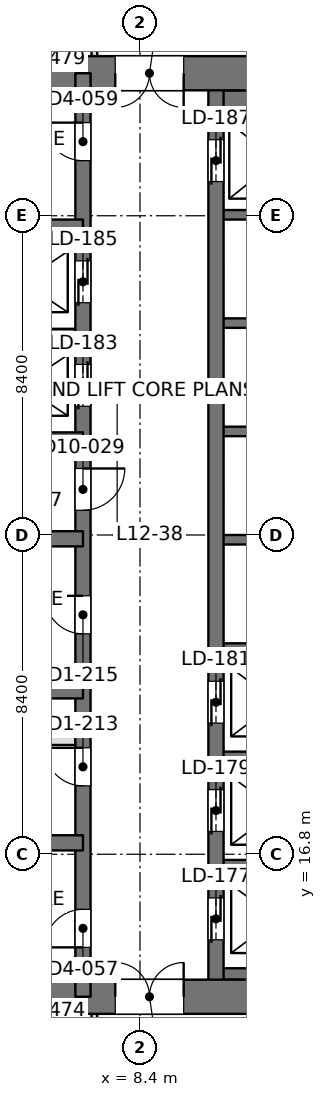
"""IFC4 building model, lengths in metres.
Left out: names, types, materials, properties, quantities, classifications, styles, units other than length and angle.
Written with IfcOpenShell. Run it as: python <this file> out.ifc"""

import sys

from ifc_helpers import new_model, si_unit, direction, frame, frame_2d, origin, place, context, subcontext, project, spatial, rectangle, extrude, element, fill, save


model = new_model("IFC4")
c1 = context("Model", 3, precision=1e-05, world=origin(), true_north=direction((0.0, 1.0)))
c2 = subcontext(c1, "Body", "Model", "MODEL_VIEW")
j1 = project(units=[si_unit("LENGTHUNIT", "METRE"), si_unit("PLANEANGLEUNIT", "RADIAN")], contexts=[c1])
p1 = place(None, origin())
s1 = spatial("IfcSite", under=j1, at=p1, CompositionType="ELEMENT")
p2 = place(p1, origin())
s2 = spatial("IfcBuilding", under=s1, at=p2, CompositionType="ELEMENT")
p3 = place(p2, frame((0.0, 0.0, 54.9)))
s3 = spatial("IfcBuildingStorey", under=s2, at=p3, CompositionType="ELEMENT", Elevation=54.9)
p4 = place(p3, frame((-1.2, 13.05, 0.0), z_axis=(0.0, 0.0, 1.0), x_axis=(1.0, 0.0, 0.0)))
e1 = element("IfcWall", 1, at=p4, inside=s3, PredefinedType="SHEAR", context=c2, shape_type="SweptSolid", body=[
    extrude(rectangle(XDim=18.0, YDim=0.9, at=frame_2d((9.0, 0.0))), origin(), (0.0, 0.0, 1.0), 4.5),
])
p5 = place(p4, frame((8.95, 0.0, 0.0)))
e2 = element("IfcOpeningElement", 2, at=p5, cuts=e1, PredefinedType="OPENING", context=c2, shape_type="SweptSolid", body=[
    extrude(rectangle(XDim=1.8, YDim=2.4, at=frame_2d((0.9, 1.2))), frame((0.0, 0.46, 0.0), z_axis=(0.0, -1.0, 0.0), x_axis=(1.0, 0.0, 0.0)), (0.0, 0.0, 1.0), 0.92),
])
p6 = place(p3, frame((-1.2, 37.35, 0.0), z_axis=(0.0, 0.0, 1.0), x_axis=(1.0, 0.0, 0.0)))
e3 = element("IfcWall", 3, at=p6, inside=s3, PredefinedType="SHEAR", context=c2, shape_type="SweptSolid", body=[
    extrude(rectangle(XDim=18.0, YDim=0.9, at=frame_2d((9.0, 0.0))), origin(), (0.0, 0.0, 1.0), 4.5),
])
p7 = place(p6, frame((8.95, 0.0, 0.0)))
e4 = element("IfcOpeningElement", 4, at=p7, cuts=e3, PredefinedType="OPENING", context=c2, shape_type="SweptSolid", body=[
    extrude(rectangle(XDim=1.8, YDim=2.4, at=frame_2d((0.9, 1.2))), frame((0.0, 0.46, 0.0), z_axis=(0.0, -1.0, 0.0), x_axis=(1.0, 0.0, 0.0)), (0.0, 0.0, 1.0), 0.92),
])
p8 = place(p3, frame((6.9, 13.05, 0.0), z_axis=(0.0, 0.0, 1.0), x_axis=(0.0, 1.0, 0.0)))
e5 = element("IfcWall", 5, at=p8, inside=s3, PredefinedType="SHEAR", context=c2, shape_type="SweptSolid", body=[
    extrude(rectangle(XDim=24.3, YDim=0.4, at=frame_2d((12.15, 0.0))), origin(), (0.0, 0.0, 1.0), 4.5),
])
p9 = place(p8, frame((1.3, 0.0, 0.0)))
e6 = element("IfcOpeningElement", 6, at=p9, cuts=e5, PredefinedType="OPENING", context=c2, shape_type="SweptSolid", body=[
    extrude(rectangle(XDim=1.0, YDim=2.2, at=frame_2d((0.5, 1.1))), frame((0.0, 0.21, 0.0), z_axis=(0.0, -1.0, 0.0), x_axis=(1.0, 0.0, 0.0)), (0.0, 0.0, 1.0), 0.42),
])
p10 = place(p8, frame((22.0, 0.0, 0.0)))
e7 = element("IfcOpeningElement", 7, at=p10, cuts=e5, PredefinedType="OPENING", context=c2, shape_type="SweptSolid", body=[
    extrude(rectangle(XDim=1.0, YDim=2.2, at=frame_2d((0.5, 1.1))), frame((0.0, 0.21, 0.0), z_axis=(0.0, -1.0, 0.0), x_axis=(1.0, 0.0, 0.0)), (0.0, 0.0, 1.0), 0.42),
])
p11 = place(p8, frame((5.55, 0.0, 0.0)))
e8 = element("IfcOpeningElement", 8, at=p11, cuts=e5, PredefinedType="OPENING", context=c2, shape_type="SweptSolid", body=[
    extrude(rectangle(XDim=1.0, YDim=2.2, at=frame_2d((0.5, 1.1))), frame((0.0, 0.21, 0.0), z_axis=(0.0, -1.0, 0.0), x_axis=(1.0, 0.0, 0.0)), (0.0, 0.0, 1.0), 0.42),
])
p12 = place(p8, frame((9.55, 0.0, 0.0)))
e9 = element("IfcOpeningElement", 9, at=p12, cuts=e5, PredefinedType="OPENING", context=c2, shape_type="SweptSolid", body=[
    extrude(rectangle(XDim=1.0, YDim=2.2, at=frame_2d((0.5, 1.1))), frame((0.0, 0.21, 0.0), z_axis=(0.0, -1.0, 0.0), x_axis=(1.0, 0.0, 0.0)), (0.0, 0.0, 1.0), 0.42),
])
p13 = place(p8, frame((12.8, 0.0, 0.0)))
e10 = element("IfcOpeningElement", 10, at=p13, cuts=e5, PredefinedType="OPENING", context=c2, shape_type="SweptSolid", body=[
    extrude(rectangle(XDim=1.1, YDim=2.2, at=frame_2d((0.55, 1.1))), frame((0.0, 0.21, 0.0), z_axis=(0.0, -1.0, 0.0), x_axis=(1.0, 0.0, 0.0)), (0.0, 0.0, 1.0), 0.42),
])
p14 = place(p8, frame((15.538, 0.0, 0.0)))
e11 = element("IfcOpeningElement", 11, at=p14, cuts=e5, PredefinedType="OPENING", context=c2, shape_type="SweptSolid", body=[
    extrude(rectangle(XDim=1.1, YDim=2.2, at=frame_2d((0.55, 1.1))), frame((0.0, 0.21, 0.0), z_axis=(0.0, -1.0, 0.0), x_axis=(1.0, 0.0, 0.0)), (0.0, 0.0, 1.0), 0.42),
])
p15 = place(p8, frame((18.262, 0.0, 0.0)))
e12 = element("IfcOpeningElement", 12, at=p15, cuts=e5, PredefinedType="OPENING", context=c2, shape_type="SweptSolid", body=[
    extrude(rectangle(XDim=1.1, YDim=2.2, at=frame_2d((0.55, 1.1))), frame((0.0, 0.21, 0.0), z_axis=(0.0, -1.0, 0.0), x_axis=(1.0, 0.0, 0.0)), (0.0, 0.0, 1.0), 0.42),
])
p16 = place(p3, frame((10.4, 13.05, 0.0), z_axis=(0.0, 0.0, 1.0), x_axis=(0.0, 1.0, 0.0)))
e13 = element("IfcWall", 13, at=p16, inside=s3, PredefinedType="SHEAR", context=c2, shape_type="SweptSolid", body=[
    extrude(rectangle(XDim=24.3, YDim=0.4, at=frame_2d((12.15, 0.0))), origin(), (0.0, 0.0, 1.0), 4.5),
])
p17 = place(p16, frame((1.5, 0.0, 0.0)))
e14 = element("IfcOpeningElement", 14, at=p17, cuts=e13, PredefinedType="OPENING", context=c2, shape_type="SweptSolid", body=[
    extrude(rectangle(XDim=1.1, YDim=2.2, at=frame_2d((0.55, 1.1))), frame((0.0, 0.21, 0.0), z_axis=(0.0, -1.0, 0.0), x_axis=(1.0, 0.0, 0.0)), (0.0, 0.0, 1.0), 0.42),
])
p18 = place(p16, frame((4.35, 0.0, 0.0)))
e15 = element("IfcOpeningElement", 15, at=p18, cuts=e13, PredefinedType="OPENING", context=c2, shape_type="SweptSolid", body=[
    extrude(rectangle(XDim=1.1, YDim=2.2, at=frame_2d((0.55, 1.1))), frame((0.0, 0.21, 0.0), z_axis=(0.0, -1.0, 0.0), x_axis=(1.0, 0.0, 0.0)), (0.0, 0.0, 1.0), 0.42),
])
p19 = place(p16, frame((7.2, 0.0, 0.0)))
e16 = element("IfcOpeningElement", 16, at=p19, cuts=e13, PredefinedType="OPENING", context=c2, shape_type="SweptSolid", body=[
    extrude(rectangle(XDim=1.1, YDim=2.2, at=frame_2d((0.55, 1.1))), frame((0.0, 0.21, 0.0), z_axis=(0.0, -1.0, 0.0), x_axis=(1.0, 0.0, 0.0)), (0.0, 0.0, 1.0), 0.42),
])
p20 = place(p16, frame((21.45, 0.0, 0.0)))
e17 = element("IfcOpeningElement", 17, at=p20, cuts=e13, PredefinedType="OPENING", context=c2, shape_type="SweptSolid", body=[
    extrude(rectangle(XDim=1.1, YDim=2.2, at=frame_2d((0.55, 1.1))), frame((0.0, 0.21, 0.0), z_axis=(0.0, -1.0, 0.0), x_axis=(1.0, 0.0, 0.0)), (0.0, 0.0, 1.0), 0.42),
])
for number, where, z_axis, x_axis in (
    (18, (-0.75, 17.1, 0.0), (0.0, 0.0, 1.0), (1.0, 0.0, 0.0)),
    (19, (-0.75, 21.1, 0.0), (0.0, 0.0, 1.0), (1.0, 0.0, 0.0)),
    (20, (-0.75, 25.1, 0.0), (0.0, 0.0, 1.0), (1.0, 0.0, 0.0)),
    (21, (-0.75, 27.7, 0.0), (0.0, 0.0, 1.0), (1.0, 0.0, 0.0)),
    (22, (-0.75, 33.3, 0.0), (0.0, 0.0, 1.0), (1.0, 0.0, 0.0)),
):
    element("IfcWall", number, at=place(p3, frame(where, z_axis=z_axis, x_axis=x_axis)), inside=s3, PredefinedType="SHEAR", context=c2, shape_type="SweptSolid", body=[
        extrude(rectangle(XDim=7.65, YDim=0.4, at=frame_2d((3.825, 0.0))), origin(), (0.0, 0.0, 1.0), 4.5),
    ])
p21 = place(p3, frame((3.7, 30.5, 0.0), z_axis=(0.0, 0.0, 1.0), x_axis=(1.0, 0.0, 0.0)))
e23 = element("IfcWall", 23, at=p21, inside=s3, PredefinedType="SHEAR", context=c2, shape_type="SweptSolid", body=[
    extrude(rectangle(XDim=3.2, YDim=0.25, at=frame_2d((1.6, 0.0))), origin(), (0.0, 0.0, 1.0), 4.5),
])
p22 = place(p3, frame((10.4, 13.65, 0.0), z_axis=(0.0, 0.0, 1.0), x_axis=(1.0, 0.0, 0.0)))
e24 = element("IfcWall", 24, at=p22, inside=s3, PredefinedType="SHEAR", context=c2, shape_type="SweptSolid", body=[
    extrude(rectangle(XDim=3.2, YDim=0.3, at=frame_2d((1.6, 0.0))), origin(), (0.0, 0.0, 1.0), 4.5),
])
for number, where, z_axis, x_axis in (
    (25, (10.4, 16.525, 0.0), (0.0, 0.0, 1.0), (1.0, 0.0, 0.0)),
    (26, (10.4, 19.375, 0.0), (0.0, 0.0, 1.0), (1.0, 0.0, 0.0)),
    (27, (10.4, 22.225, 0.0), (0.0, 0.0, 1.0), (1.0, 0.0, 0.0)),
    (28, (10.4, 25.075, 0.0), (0.0, 0.0, 1.0), (1.0, 0.0, 0.0)),
    (29, (10.4, 27.925, 0.0), (0.0, 0.0, 1.0), (1.0, 0.0, 0.0)),
    (30, (10.4, 30.775, 0.0), (0.0, 0.0, 1.0), (1.0, 0.0, 0.0)),
    (31, (10.4, 33.625, 0.0), (0.0, 0.0, 1.0), (1.0, 0.0, 0.0)),
):
    element("IfcWall", number, at=place(p3, frame(where, z_axis=z_axis, x_axis=x_axis)), inside=s3, PredefinedType="SHEAR", context=c2, shape_type="SweptSolid", body=[
        extrude(rectangle(XDim=3.2, YDim=0.25, at=frame_2d((1.6, 0.0))), origin(), (0.0, 0.0, 1.0), 4.5),
    ])
p23 = place(p3, frame((10.4, 36.625, 0.0), z_axis=(0.0, 0.0, 1.0), x_axis=(1.0, 0.0, 0.0)))
e32 = element("IfcWall", 32, at=p23, inside=s3, PredefinedType="SHEAR", context=c2, shape_type="SweptSolid", body=[
    extrude(rectangle(XDim=3.2, YDim=0.55, at=frame_2d((1.6, 0.0))), origin(), (0.0, 0.0, 1.0), 4.5),
])
p24 = place(p3, frame((7.2, 10.474, 0.0), z_axis=(0.0, 0.0, 1.0), x_axis=(0.0, 1.0, 0.0)))
e33 = element("IfcWall", 33, at=p24, inside=s3, PredefinedType="PARTITIONING", context=c2, shape_type="SweptSolid", body=[
    extrude(rectangle(XDim=2.128, YDim=0.15, at=frame_2d((1.064, 0.0))), origin(), (0.0, 0.0, 1.0), 4.34),
])
p25 = place(p24, frame((0.526, 0.0, 0.0)))
e34 = element("IfcOpeningElement", 34, at=p25, cuts=e33, PredefinedType="OPENING", context=c2, shape_type="SweptSolid", body=[
    extrude(rectangle(XDim=1.0, YDim=2.2, at=frame_2d((0.5, 1.1))), frame((0.0, 0.085, 0.0), z_axis=(0.0, -1.0, 0.0), x_axis=(1.0, 0.0, 0.0)), (0.0, 0.0, 1.0), 0.17),
])
p26 = place(p3, frame((7.2, 37.8, 0.0), z_axis=(0.0, 0.0, 1.0), x_axis=(0.0, 1.0, 0.0)))
e35 = element("IfcWall", 35, at=p26, inside=s3, PredefinedType="PARTITIONING", context=c2, shape_type="SweptSolid", body=[
    extrude(rectangle(XDim=2.126, YDim=0.15, at=frame_2d((1.063, 0.0))), origin(), (0.0, 0.0, 1.0), 4.34),
])
p27 = place(p26, frame((0.6, 0.0, 0.0)))
e36 = element("IfcOpeningElement", 36, at=p27, cuts=e35, PredefinedType="OPENING", context=c2, shape_type="SweptSolid", body=[
    extrude(rectangle(XDim=1.0, YDim=2.2, at=frame_2d((0.5, 1.1))), frame((0.0, 0.085, 0.0), z_axis=(0.0, -1.0, 0.0), x_axis=(1.0, 0.0, 0.0)), (0.0, 0.0, 1.0), 0.17),
])
p28 = place(p3, frame((0.1, 19.8, 0.0), z_axis=(0.0, 0.0, 1.0), x_axis=(1.0, 0.0, 0.0)))
e37 = element("IfcWall", 37, at=p28, inside=s3, PredefinedType="PARTITIONING", context=c2, shape_type="SweptSolid", body=[
    extrude(rectangle(XDim=6.6, YDim=0.25, at=frame_2d((3.3, 0.0))), origin(), (0.0, 0.0, 1.0), 4.3),
])
p29 = place(p28, frame((2.875, 0.0, 0.0)))
e38 = element("IfcOpeningElement", 38, at=p29, cuts=e37, PredefinedType="OPENING", context=c2, shape_type="SweptSolid", body=[
    extrude(rectangle(XDim=0.9, YDim=2.2, at=frame_2d((0.45, 1.1))), frame((0.0, 0.135, 0.0), z_axis=(0.0, -1.0, 0.0), x_axis=(1.0, 0.0, 0.0)), (0.0, 0.0, 1.0), 0.27),
])
p30 = place(p5, origin())
e39 = element("IfcDoor", 39, at=p30, inside=s3, OperationType="DOUBLE_DOOR_SINGLE_SWING", PredefinedType="DOOR", context=c2, shape_type="SweptSolid", body=[
    extrude(rectangle(XDim=1.8, YDim=2.4, at=frame_2d((0.9, 1.2))), frame((0.0, 0.025, 0.0), z_axis=(0.0, -1.0, 0.0), x_axis=(1.0, 0.0, 0.0)), (0.0, 0.0, 1.0), 0.05),
])
fill(e2, e39)
p31 = place(p7, frame((1.8, 0.0, 0.0), z_axis=(0.0, 0.0, 1.0), x_axis=(-1.0, 0.0, 0.0)))
e40 = element("IfcDoor", 40, at=p31, inside=s3, OperationType="DOUBLE_DOOR_SINGLE_SWING", PredefinedType="DOOR", context=c2, shape_type="SweptSolid", body=[
    extrude(rectangle(XDim=1.8, YDim=2.4, at=frame_2d((0.9, 1.2))), frame((0.0, 0.025, 0.0), z_axis=(0.0, -1.0, 0.0), x_axis=(1.0, 0.0, 0.0)), (0.0, 0.0, 1.0), 0.05),
])
fill(e4, e40)
p32 = place(p9, origin())
e41 = element("IfcDoor", 41, at=p32, inside=s3, OperationType="SINGLE_SWING_LEFT", PredefinedType="DOOR", context=c2, shape_type="SweptSolid", body=[
    extrude(rectangle(XDim=1.0, YDim=2.2, at=frame_2d((0.5, 1.1))), frame((0.0, 0.025, 0.0), z_axis=(0.0, -1.0, 0.0), x_axis=(1.0, 0.0, 0.0)), (0.0, 0.0, 1.0), 0.05),
])
fill(e6, e41)
p33 = place(p10, origin())
e42 = element("IfcDoor", 42, at=p33, inside=s3, OperationType="SINGLE_SWING_RIGHT", PredefinedType="DOOR", context=c2, shape_type="SweptSolid", body=[
    extrude(rectangle(XDim=1.0, YDim=2.2, at=frame_2d((0.5, 1.1))), frame((0.0, 0.025, 0.0), z_axis=(0.0, -1.0, 0.0), x_axis=(1.0, 0.0, 0.0)), (0.0, 0.0, 1.0), 0.05),
])
fill(e7, e42)
p34 = place(p11, origin())
e43 = element("IfcDoor", 43, at=p34, inside=s3, OperationType="SINGLE_SWING_RIGHT", PredefinedType="DOOR", context=c2, shape_type="SweptSolid", body=[
    extrude(rectangle(XDim=1.0, YDim=2.2, at=frame_2d((0.5, 1.1))), frame((0.0, 0.025, 0.0), z_axis=(0.0, -1.0, 0.0), x_axis=(1.0, 0.0, 0.0)), (0.0, 0.0, 1.0), 0.05),
])
fill(e8, e43)
p35 = place(p12, origin())
e44 = element("IfcDoor", 44, at=p35, inside=s3, OperationType="SINGLE_SWING_RIGHT", PredefinedType="DOOR", context=c2, shape_type="SweptSolid", body=[
    extrude(rectangle(XDim=1.0, YDim=2.2, at=frame_2d((0.5, 1.1))), frame((0.0, 0.025, 0.0), z_axis=(0.0, -1.0, 0.0), x_axis=(1.0, 0.0, 0.0)), (0.0, 0.0, 1.0), 0.05),
])
fill(e9, e44)
p36 = place(p13, frame((1.1, 0.0, 0.0), z_axis=(0.0, 0.0, 1.0), x_axis=(-1.0, 0.0, 0.0)))
e45 = element("IfcDoor", 45, at=p36, inside=s3, OperationType="SINGLE_SWING_LEFT", PredefinedType="DOOR", context=c2, shape_type="SweptSolid", body=[
    extrude(rectangle(XDim=1.1, YDim=2.2, at=frame_2d((0.55, 1.1))), frame((0.0, 0.025, 0.0), z_axis=(0.0, -1.0, 0.0), x_axis=(1.0, 0.0, 0.0)), (0.0, 0.0, 1.0), 0.05),
])
fill(e10, e45)
p37 = place(p17, origin())
e46 = element("IfcDoor", 46, at=p37, inside=s3, OperationType="DOUBLE_DOOR_SLIDING", PredefinedType="DOOR", context=c2, shape_type="SweptSolid", body=[
    extrude(rectangle(XDim=1.1, YDim=2.2, at=frame_2d((0.55, 1.1))), frame((0.0, 0.025, 0.0), z_axis=(0.0, -1.0, 0.0), x_axis=(1.0, 0.0, 0.0)), (0.0, 0.0, 1.0), 0.05),
])
fill(e14, e46)
p38 = place(p18, origin())
e47 = element("IfcDoor", 47, at=p38, inside=s3, OperationType="DOUBLE_DOOR_SLIDING", PredefinedType="DOOR", context=c2, shape_type="SweptSolid", body=[
    extrude(rectangle(XDim=1.1, YDim=2.2, at=frame_2d((0.55, 1.1))), frame((0.0, 0.025, 0.0), z_axis=(0.0, -1.0, 0.0), x_axis=(1.0, 0.0, 0.0)), (0.0, 0.0, 1.0), 0.05),
])
fill(e15, e47)
p39 = place(p19, origin())
e48 = element("IfcDoor", 48, at=p39, inside=s3, OperationType="DOUBLE_DOOR_SLIDING", PredefinedType="DOOR", context=c2, shape_type="SweptSolid", body=[
    extrude(rectangle(XDim=1.1, YDim=2.2, at=frame_2d((0.55, 1.1))), frame((0.0, 0.025, 0.0), z_axis=(0.0, -1.0, 0.0), x_axis=(1.0, 0.0, 0.0)), (0.0, 0.0, 1.0), 0.05),
])
fill(e16, e48)
p40 = place(p20, origin())
e49 = element("IfcDoor", 49, at=p40, inside=s3, OperationType="DOUBLE_DOOR_SLIDING", PredefinedType="DOOR", context=c2, shape_type="SweptSolid", body=[
    extrude(rectangle(XDim=1.1, YDim=2.2, at=frame_2d((0.55, 1.1))), frame((0.0, 0.025, 0.0), z_axis=(0.0, -1.0, 0.0), x_axis=(1.0, 0.0, 0.0)), (0.0, 0.0, 1.0), 0.05),
])
fill(e17, e49)
p41 = place(p14, origin())
e50 = element("IfcDoor", 50, at=p41, inside=s3, OperationType="DOUBLE_DOOR_SLIDING", PredefinedType="DOOR", context=c2, shape_type="SweptSolid", body=[
    extrude(rectangle(XDim=1.1, YDim=2.2, at=frame_2d((0.55, 1.1))), frame((0.0, 0.025, 0.0), z_axis=(0.0, -1.0, 0.0), x_axis=(1.0, 0.0, 0.0)), (0.0, 0.0, 1.0), 0.05),
])
fill(e11, e50)
p42 = place(p15, origin())
e51 = element("IfcDoor", 51, at=p42, inside=s3, OperationType="DOUBLE_DOOR_SLIDING", PredefinedType="DOOR", context=c2, shape_type="SweptSolid", body=[
    extrude(rectangle(XDim=1.1, YDim=2.2, at=frame_2d((0.55, 1.1))), frame((0.0, 0.025, 0.0), z_axis=(0.0, -1.0, 0.0), x_axis=(1.0, 0.0, 0.0)), (0.0, 0.0, 1.0), 0.05),
])
fill(e12, e51)
save(model, sys.argv[1])
